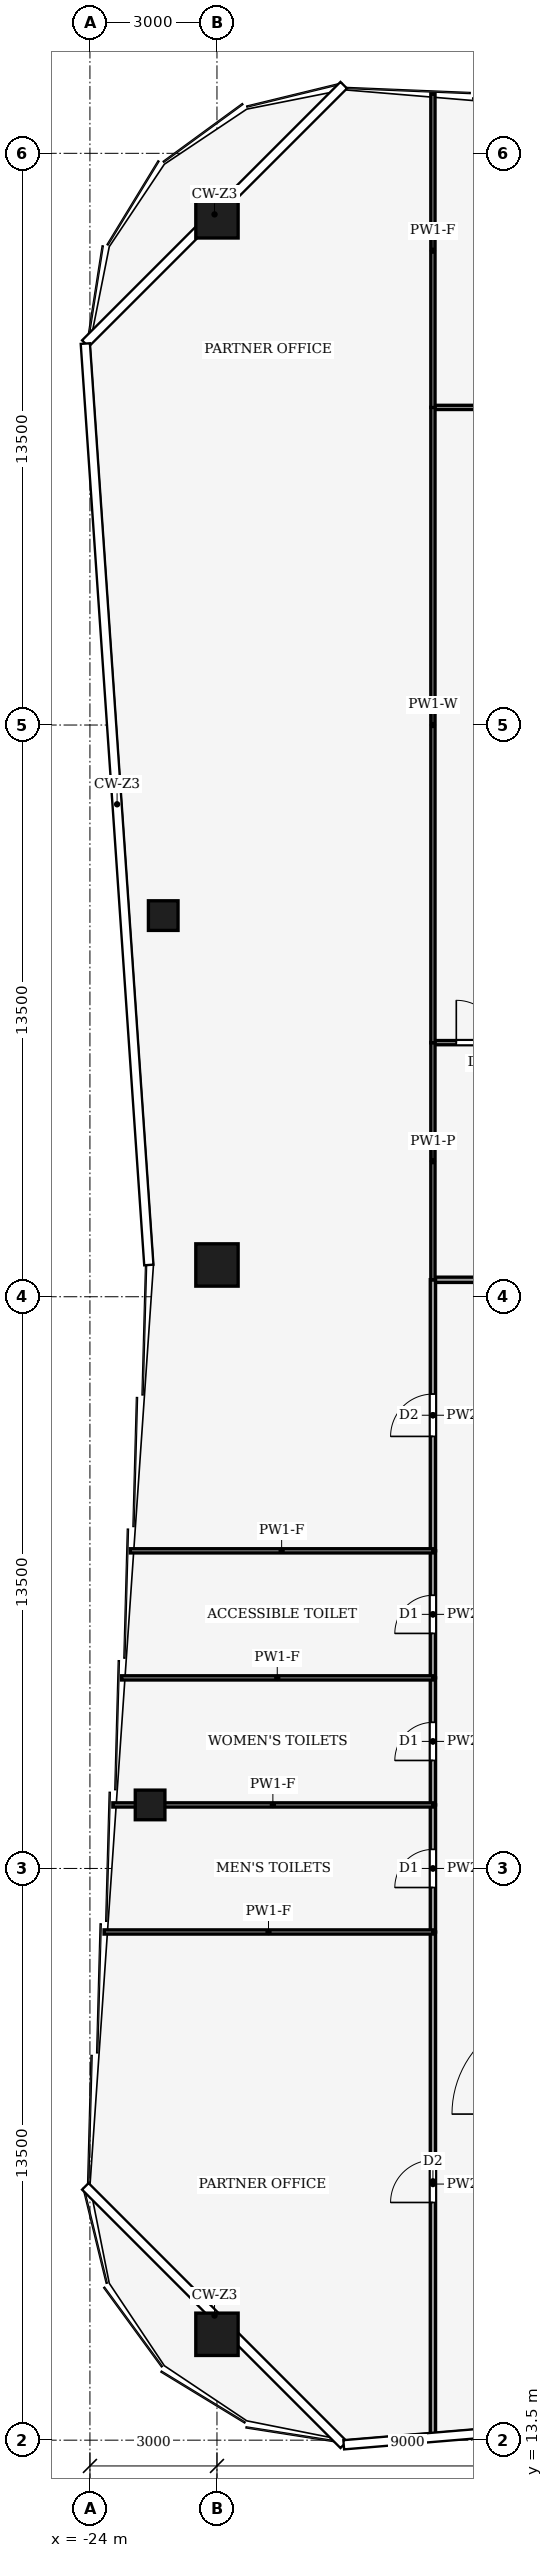
"""IFC4 building model, lengths in metres.
Left out: names, types, materials, properties, quantities, classifications, styles, units other than length and angle.
Written with IfcOpenShell. Run it as: python <this file> out.ifc"""

import sys

from ifc_helpers import new_model, si_unit, direction, frame, frame_2d, origin, origin_2d, place, context, subcontext, project, spatial, rectangle, hollow_rectangle, extrude, element, fill, save


model = new_model("IFC4")
c1 = context("Model", 3, precision=1e-05, world=origin(), true_north=direction((0.0, 1.0)))
c2 = subcontext(c1, "Body", "Model", "MODEL_VIEW")
j1 = project(units=[si_unit("LENGTHUNIT", "METRE"), si_unit("PLANEANGLEUNIT", "RADIAN")], contexts=[c1])
p1 = place(None, origin())
s1 = spatial("IfcSite", under=j1, at=p1, CompositionType="ELEMENT")
p2 = place(p1, origin())
s2 = spatial("IfcBuilding", under=s1, at=p2, CompositionType="ELEMENT")
p3 = place(p2, frame((0.0, 0.0, 186.0)))
s3 = spatial("IfcBuildingStorey", under=s2, at=p3, CompositionType="ELEMENT", Elevation=186.0)
for number, where, z_axis, x_axis in (
    (1, (-21.0, 66.0, 0.0), (0.0, 0.0, 1.0), (1.0, 0.0, 0.0)),
    (2, (-21.0, 16.0, 0.0), (0.0, 0.0, 1.0), (1.0, 0.0, 0.0)),
    (3, (-21.0, 41.25, 0.0), (0.0, 0.0, 1.0), (1.0, 0.0, 0.0)),
):
    element("IfcColumn", number, at=place(p3, frame(where, z_axis=z_axis, x_axis=x_axis)), inside=s3, PredefinedType="COLUMN", context=c2, shape_type="SweptSolid", body=[
        extrude(hollow_rectangle(XDim=1.0, YDim=1.0, WallThickness=0.06, at=origin_2d()), origin(), (0.0, 0.0, 1.0), 4.0),
    ])
for number, where, z_axis, x_axis in (
    (4, (-22.579, 28.5, 0.0), (0.0, 0.0, 1.0), (1.0, 0.0, 0.0)),
    (5, (-22.269, 49.5, 0.0), (0.0, 0.0, 1.0), (1.0, 0.0, 0.0)),
):
    element("IfcColumn", number, at=place(p3, frame(where, z_axis=z_axis, x_axis=x_axis)), inside=s3, PredefinedType="COLUMN", context=c2, shape_type="SweptSolid", body=[
        extrude(hollow_rectangle(XDim=0.7, YDim=0.7, WallThickness=0.03, at=origin_2d()), origin(), (0.0, 0.0, 1.0), 4.0),
    ])
p4 = place(p3, frame((-15.9, 40.9, 0.0), z_axis=(0.0, 0.0, 1.0), x_axis=(1.0, 0.0, 0.0)))
e6 = element("IfcWall", 6, at=p4, inside=s3, PredefinedType="PARTITIONING", context=c2, shape_type="SweptSolid", body=[
    extrude(rectangle(XDim=6.9, YDim=0.125, at=frame_2d((3.45, 0.0))), origin(), (0.0, 0.0, 1.0), 3.44),
])
p5 = place(p4, frame((2.95, 0.0, 0.0)))
e7 = element("IfcOpeningElement", 7, at=p5, cuts=e6, PredefinedType="OPENING", context=c2, shape_type="SweptSolid", body=[
    extrude(rectangle(XDim=1.0, YDim=2.1, at=frame_2d((0.5, 1.05))), frame((0.0, 0.073, 0.0), z_axis=(0.0, -1.0, 0.0), x_axis=(1.0, 0.0, 0.0)), (0.0, 0.0, 1.0), 0.145),
])
p6 = place(p3, frame((-15.9, 13.595, 0.0), z_axis=(0.0, 0.0, 1.0), x_axis=(0.0, 1.0, 0.0)))
e8 = element("IfcWall", 8, at=p6, inside=s3, PredefinedType="PARTITIONING", context=c2, shape_type="SweptSolid", body=[
    extrude(rectangle(XDim=11.905, YDim=0.125, at=frame_2d((5.953, 0.0))), origin(), (0.0, 0.0, 1.0), 3.04),
])
p7 = place(p6, frame((5.518, 0.0, 0.0)))
e9 = element("IfcOpeningElement", 9, at=p7, cuts=e8, PredefinedType="OPENING", context=c2, shape_type="SweptSolid", body=[
    extrude(rectangle(XDim=1.0, YDim=2.1, at=frame_2d((0.5, 1.05))), frame((0.0, 0.073, 0.0), z_axis=(0.0, -1.0, 0.0), x_axis=(1.0, 0.0, 0.0)), (0.0, 0.0, 1.0), 0.145),
])
p8 = place(p3, frame((-15.9, 25.5, 0.0), z_axis=(0.0, 0.0, 1.0), x_axis=(0.0, 1.0, 0.0)))
e10 = element("IfcWall", 10, at=p8, inside=s3, PredefinedType="PARTITIONING", context=c2, shape_type="SweptSolid", body=[
    extrude(rectangle(XDim=3.0, YDim=0.125, at=frame_2d((1.5, 0.0))), origin(), (0.0, 0.0, 1.0), 3.87),
])
p9 = place(p8, frame((1.05, 0.0, 0.0)))
e11 = element("IfcOpeningElement", 11, at=p9, cuts=e10, PredefinedType="OPENING", context=c2, shape_type="SweptSolid", body=[
    extrude(rectangle(XDim=0.9, YDim=2.1, at=frame_2d((0.45, 1.05))), frame((0.0, 0.073, 0.0), z_axis=(0.0, -1.0, 0.0), x_axis=(1.0, 0.0, 0.0)), (0.0, 0.0, 1.0), 0.145),
])
p10 = place(p3, frame((-15.9, 28.5, 0.0), z_axis=(0.0, 0.0, 1.0), x_axis=(0.0, 1.0, 0.0)))
e12 = element("IfcWall", 12, at=p10, inside=s3, PredefinedType="PARTITIONING", context=c2, shape_type="SweptSolid", body=[
    extrude(rectangle(XDim=3.0, YDim=0.125, at=frame_2d((1.5, 0.0))), origin(), (0.0, 0.0, 1.0), 3.87),
])
p11 = place(p10, frame((1.05, 0.0, 0.0)))
e13 = element("IfcOpeningElement", 13, at=p11, cuts=e12, PredefinedType="OPENING", context=c2, shape_type="SweptSolid", body=[
    extrude(rectangle(XDim=0.9, YDim=2.1, at=frame_2d((0.45, 1.05))), frame((0.0, 0.073, 0.0), z_axis=(0.0, -1.0, 0.0), x_axis=(1.0, 0.0, 0.0)), (0.0, 0.0, 1.0), 0.145),
])
p12 = place(p3, frame((-15.9, 31.5, 0.0), z_axis=(0.0, 0.0, 1.0), x_axis=(0.0, 1.0, 0.0)))
e14 = element("IfcWall", 14, at=p12, inside=s3, PredefinedType="PARTITIONING", context=c2, shape_type="SweptSolid", body=[
    extrude(rectangle(XDim=3.0, YDim=0.125, at=frame_2d((1.5, 0.0))), origin(), (0.0, 0.0, 1.0), 3.87),
])
p13 = place(p12, frame((1.05, 0.0, 0.0)))
e15 = element("IfcOpeningElement", 15, at=p13, cuts=e14, PredefinedType="OPENING", context=c2, shape_type="SweptSolid", body=[
    extrude(rectangle(XDim=0.9, YDim=2.1, at=frame_2d((0.45, 1.05))), frame((0.0, 0.073, 0.0), z_axis=(0.0, -1.0, 0.0), x_axis=(1.0, 0.0, 0.0)), (0.0, 0.0, 1.0), 0.145),
])
p14 = place(p3, frame((-15.9, 34.5, 0.0), z_axis=(0.0, 0.0, 1.0), x_axis=(0.0, 1.0, 0.0)))
e16 = element("IfcWall", 16, at=p14, inside=s3, PredefinedType="PARTITIONING", context=c2, shape_type="SweptSolid", body=[
    extrude(rectangle(XDim=6.404, YDim=0.125, at=frame_2d((3.202, 0.0))), origin(), (0.0, 0.0, 1.0), 3.14),
])
p15 = place(p14, frame((2.702, 0.0, 0.0)))
e17 = element("IfcOpeningElement", 17, at=p15, cuts=e16, PredefinedType="OPENING", context=c2, shape_type="SweptSolid", body=[
    extrude(rectangle(XDim=1.0, YDim=2.1, at=frame_2d((0.5, 1.05))), frame((0.0, 0.073, 0.0), z_axis=(0.0, -1.0, 0.0), x_axis=(1.0, 0.0, 0.0)), (0.0, 0.0, 1.0), 0.145),
])
p16 = place(p3, frame((-15.9, 46.5, 0.0), z_axis=(0.0, 0.0, 1.0), x_axis=(1.0, 0.0, 0.0)))
e18 = element("IfcWall", 18, at=p16, inside=s3, PredefinedType="PARTITIONING", context=c2, shape_type="SweptSolid", body=[
    extrude(rectangle(XDim=6.904, YDim=0.1, at=frame_2d((3.452, 0.0))), origin(), (0.0, 0.0, 1.0), 3.44),
])
p17 = place(p16, frame((0.552, 0.0, 0.0)))
e19 = element("IfcOpeningElement", 19, at=p17, cuts=e18, PredefinedType="OPENING", context=c2, shape_type="SweptSolid", body=[
    extrude(rectangle(XDim=1.0, YDim=2.1, at=frame_2d((0.5, 1.05))), frame((0.0, 0.06, 0.0), z_axis=(0.0, -1.0, 0.0), x_axis=(1.0, 0.0, 0.0)), (0.0, 0.0, 1.0), 0.12),
])
p18 = place(p3, frame((-15.9, 46.504, 0.0), z_axis=(0.0, 0.0, 1.0), x_axis=(0.0, -1.0, 0.0)))
e20 = element("IfcWall", 20, at=p18, inside=s3, PredefinedType="PARTITIONING", context=c2, shape_type="SweptSolid", body=[
    extrude(rectangle(XDim=5.608, YDim=0.1, at=frame_2d((2.804, 0.0))), origin(), (0.0, 0.0, 1.0), 3.44),
])
p19 = place(p3, frame((-15.9, 61.5, 0.0), z_axis=(0.0, 0.0, 1.0), x_axis=(1.0, 0.0, 0.0)))
e21 = element("IfcWall", 21, at=p19, inside=s3, PredefinedType="PARTITIONING", context=c2, shape_type="SweptSolid", body=[
    extrude(rectangle(XDim=9.9, YDim=0.1, at=frame_2d((4.95, 0.0))), origin(), (0.0, 0.0, 1.0), 3.24),
])
p20 = place(p19, frame((4.45, 0.0, 0.0)))
e22 = element("IfcOpeningElement", 22, at=p20, cuts=e21, PredefinedType="OPENING", context=c2, shape_type="SweptSolid", body=[
    extrude(rectangle(XDim=1.0, YDim=2.1, at=frame_2d((0.5, 1.05))), frame((0.0, 0.06, 0.0), z_axis=(0.0, -1.0, 0.0), x_axis=(1.0, 0.0, 0.0)), (0.0, 0.0, 1.0), 0.12),
])
p21 = place(p3, frame((-15.9, 61.504, 0.0), z_axis=(0.0, 0.0, 1.0), x_axis=(0.0, -1.0, 0.0)))
e23 = element("IfcWall", 23, at=p21, inside=s3, PredefinedType="PARTITIONING", context=c2, shape_type="SweptSolid", body=[
    extrude(rectangle(XDim=15.008, YDim=0.1, at=frame_2d((7.504, 0.0))), origin(), (0.0, 0.0, 1.0), 3.24),
])
p22 = place(p3, frame((-15.9, 68.905, 0.0), z_axis=(0.0, 0.0, 1.0), x_axis=(0.0, -1.0, 0.0)))
e24 = element("IfcWall", 24, at=p22, inside=s3, PredefinedType="PARTITIONING", context=c2, shape_type="SweptSolid", body=[
    extrude(rectangle(XDim=7.409, YDim=0.1, at=frame_2d((3.705, 0.0))), origin(), (0.0, 0.0, 1.0), 3.04),
])
p23 = place(p3, frame((-15.9, 25.5, 0.0), z_axis=(0.0, 0.0, 1.0), x_axis=(-1.0, 0.0, 0.0)))
e25 = element("IfcWall", 25, at=p23, inside=s3, PredefinedType="PARTITIONING", context=c2, shape_type="SweptSolid", body=[
    extrude(rectangle(XDim=7.766, YDim=0.1, at=frame_2d((3.883, 0.0))), origin(), (0.0, 0.0, 1.0), 3.04),
])
p24 = place(p3, frame((-15.9, 28.5, 0.0), z_axis=(0.0, 0.0, 1.0), x_axis=(-1.0, 0.0, 0.0)))
e26 = element("IfcWall", 26, at=p24, inside=s3, PredefinedType="PARTITIONING", context=c2, shape_type="SweptSolid", body=[
    extrude(rectangle(XDim=7.559, YDim=0.1, at=frame_2d((3.78, 0.0))), origin(), (0.0, 0.0, 1.0), 3.04),
])
p25 = place(p3, frame((-15.9, 31.5, 0.0), z_axis=(0.0, 0.0, 1.0), x_axis=(-1.0, 0.0, 0.0)))
e27 = element("IfcWall", 27, at=p25, inside=s3, PredefinedType="PARTITIONING", context=c2, shape_type="SweptSolid", body=[
    extrude(rectangle(XDim=7.353, YDim=0.1, at=frame_2d((3.676, 0.0))), origin(), (0.0, 0.0, 1.0), 3.04),
])
p26 = place(p3, frame((-15.9, 34.5, 0.0), z_axis=(0.0, 0.0, 1.0), x_axis=(-1.0, 0.0, 0.0)))
e28 = element("IfcWall", 28, at=p26, inside=s3, PredefinedType="PARTITIONING", context=c2, shape_type="SweptSolid", body=[
    extrude(rectangle(XDim=7.146, YDim=0.1, at=frame_2d((3.573, 0.0))), origin(), (0.0, 0.0, 1.0), 3.04),
])
p27 = place(p7, origin())
e29 = element("IfcDoor", 29, at=p27, inside=s3, OperationType="SINGLE_SWING_RIGHT", PredefinedType="DOOR", context=c2, shape_type="SweptSolid", body=[
    extrude(rectangle(XDim=1.0, YDim=2.1, at=frame_2d((0.5, 1.05))), frame((0.0, 0.025, 0.0), z_axis=(0.0, -1.0, 0.0), x_axis=(1.0, 0.0, 0.0)), (0.0, 0.0, 1.0), 0.05),
])
fill(e9, e29)
p28 = place(p9, origin())
e30 = element("IfcDoor", 30, at=p28, inside=s3, OperationType="SINGLE_SWING_RIGHT", PredefinedType="DOOR", context=c2, shape_type="SweptSolid", body=[
    extrude(rectangle(XDim=0.9, YDim=2.1, at=frame_2d((0.45, 1.05))), frame((0.0, 0.025, 0.0), z_axis=(0.0, -1.0, 0.0), x_axis=(1.0, 0.0, 0.0)), (0.0, 0.0, 1.0), 0.05),
])
fill(e11, e30)
p29 = place(p11, origin())
e31 = element("IfcDoor", 31, at=p29, inside=s3, OperationType="SINGLE_SWING_LEFT", PredefinedType="DOOR", context=c2, shape_type="SweptSolid", body=[
    extrude(rectangle(XDim=0.9, YDim=2.1, at=frame_2d((0.45, 1.05))), frame((0.0, 0.025, 0.0), z_axis=(0.0, -1.0, 0.0), x_axis=(1.0, 0.0, 0.0)), (0.0, 0.0, 1.0), 0.05),
])
fill(e13, e31)
p30 = place(p13, origin())
e32 = element("IfcDoor", 32, at=p30, inside=s3, OperationType="SINGLE_SWING_RIGHT", PredefinedType="DOOR", context=c2, shape_type="SweptSolid", body=[
    extrude(rectangle(XDim=0.9, YDim=2.1, at=frame_2d((0.45, 1.05))), frame((0.0, 0.025, 0.0), z_axis=(0.0, -1.0, 0.0), x_axis=(1.0, 0.0, 0.0)), (0.0, 0.0, 1.0), 0.05),
])
fill(e15, e32)
p31 = place(p15, origin())
e33 = element("IfcDoor", 33, at=p31, inside=s3, OperationType="SINGLE_SWING_LEFT", PredefinedType="DOOR", context=c2, shape_type="SweptSolid", body=[
    extrude(rectangle(XDim=1.0, YDim=2.1, at=frame_2d((0.5, 1.05))), frame((0.0, 0.025, 0.0), z_axis=(0.0, -1.0, 0.0), x_axis=(1.0, 0.0, 0.0)), (0.0, 0.0, 1.0), 0.05),
])
fill(e17, e33)
p32 = place(p17, origin())
e34 = element("IfcDoor", 34, at=p32, inside=s3, OperationType="SINGLE_SWING_LEFT", PredefinedType="DOOR", context=c2, shape_type="SweptSolid", body=[
    extrude(rectangle(XDim=1.0, YDim=2.1, at=frame_2d((0.5, 1.05))), frame((0.0, 0.025, 0.0), z_axis=(0.0, -1.0, 0.0), x_axis=(1.0, 0.0, 0.0)), (0.0, 0.0, 1.0), 0.05),
])
fill(e19, e34)
save(model, sys.argv[1])
